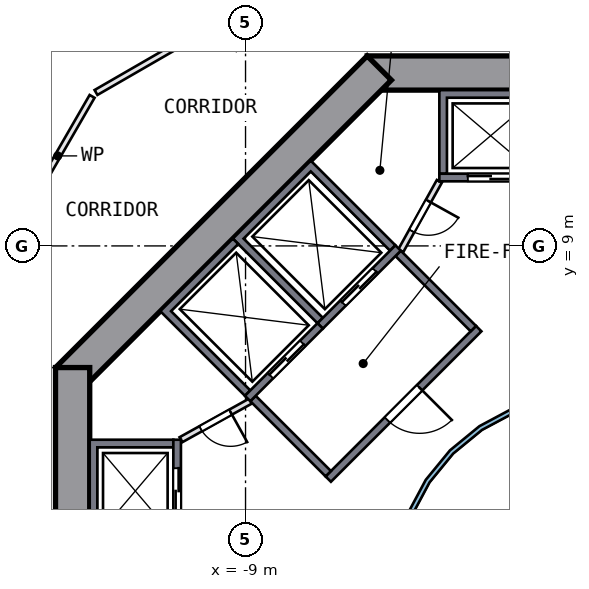
"""IFC4 building model, lengths in metres.
Left out: names, types, materials, properties, quantities, classifications, styles, units other than length and angle.
Written with IfcOpenShell. Run it as: python <this file> out.ifc"""

import sys

from ifc_helpers import new_model, si_unit, direction, frame, frame_2d, origin, place, context, subcontext, project, spatial, polyline, rectangle, outline, extrude, element, fill, save


model = new_model("IFC4")
c1 = context("Model", 3, precision=1e-05, world=origin(), true_north=direction((0.0, 1.0)))
c2 = subcontext(c1, "Body", "Model", "MODEL_VIEW")
j1 = project(units=[si_unit("LENGTHUNIT", "METRE"), si_unit("PLANEANGLEUNIT", "RADIAN")], contexts=[c1])
p1 = place(None, origin())
s1 = spatial("IfcSite", under=j1, at=p1, CompositionType="ELEMENT")
p2 = place(p1, origin())
s2 = spatial("IfcBuilding", under=s1, at=p2, CompositionType="ELEMENT")
p3 = place(p2, frame((0.0, 0.0, 19.0)))
s3 = spatial("IfcBuildingStorey", under=s2, at=p3, CompositionType="ELEMENT", Elevation=19.0)
p4 = place(p3, frame((5.799, 13.55, 0.0), z_axis=(0.0, 0.0, 1.0), x_axis=(-1.0, 0.0, 0.0)))
e1 = element("IfcWall", 1, at=p4, inside=s3, PredefinedType="SHEAR", context=c2, shape_type="SweptSolid", body=[
    extrude(rectangle(XDim=11.598, YDim=0.9, at=frame_2d((5.799, 0.0))), origin(), (0.0, 0.0, 1.0), 4.5),
])
p5 = place(p4, frame((4.899, 0.0, 0.0)))
e2 = element("IfcOpeningElement", 2, at=p5, cuts=e1, PredefinedType="OPENING", context=c2, shape_type="SweptSolid", body=[
    extrude(rectangle(XDim=1.8, YDim=2.1, at=frame_2d((0.9, 1.05))), frame((0.0, 0.46, 0.0), z_axis=(0.0, -1.0, 0.0), x_axis=(1.0, 0.0, 0.0)), (0.0, 0.0, 1.0), 0.92),
])
p6 = place(p3, frame((-5.481, 13.682, 0.0), z_axis=(0.0, 0.0, 1.0), x_axis=(-0.707106781, -0.707106781, 0.0)))
e3 = element("IfcWall", 3, at=p6, inside=s3, PredefinedType="SHEAR", context=c2, shape_type="SweptSolid", body=[
    extrude(rectangle(XDim=11.598, YDim=0.9, at=frame_2d((5.799, 0.0))), origin(), (0.0, 0.0, 1.0), 4.5),
])
p7 = place(p3, frame((-13.55, 5.799, 0.0), z_axis=(0.0, 0.0, 1.0), x_axis=(0.0, -1.0, 0.0)))
e4 = element("IfcWall", 4, at=p7, inside=s3, PredefinedType="SHEAR", context=c2, shape_type="SweptSolid", body=[
    extrude(rectangle(XDim=11.598, YDim=0.9, at=frame_2d((5.799, 0.0))), origin(), (0.0, 0.0, 1.0), 4.5),
])
p8 = place(p7, frame((4.899, 0.0, 0.0)))
e5 = element("IfcOpeningElement", 5, at=p8, cuts=e4, PredefinedType="OPENING", context=c2, shape_type="SweptSolid", body=[
    extrude(rectangle(XDim=1.8, YDim=2.1, at=frame_2d((0.9, 1.05))), frame((0.0, 0.46, 0.0), z_axis=(0.0, -1.0, 0.0), x_axis=(1.0, 0.0, 0.0)), (0.0, 0.0, 1.0), 0.92),
])
p9 = place(p3, origin())
e6 = element("IfcWall", 6, at=p9, inside=s3, PredefinedType="SOLIDWALL", context=c2, shape_type="SweptSolid", body=[
    extrude(outline(polyline([(-3.9, 10.9), (-3.9, 13.1), (-1.2, 13.1), (-1.2, 10.9), (-1.4, 10.9), (-1.4, 12.9), (-3.7, 12.9), (-3.7, 10.9), (-3.9, 10.9)])), origin(), (0.0, 0.0, 1.0), 4.05),
])
p10 = place(p3, frame((-1.2, 10.8, 0.0), z_axis=(0.0, 0.0, 1.0), x_axis=(-1.0, 0.0, 0.0)))
e7 = element("IfcWall", 7, at=p10, inside=s3, PredefinedType="SOLIDWALL", context=c2, shape_type="SweptSolid", body=[
    extrude(rectangle(XDim=2.7, YDim=0.2, at=frame_2d((1.35, 0.0))), origin(), (0.0, 0.0, 1.0), 4.05),
])
p11 = place(p10, frame((0.75, 0.0, 0.0)))
e8 = element("IfcOpeningElement", 8, at=p11, cuts=e7, PredefinedType="OPENING", context=c2, shape_type="SweptSolid", body=[
    extrude(rectangle(XDim=1.2, YDim=2.1, at=frame_2d((0.6, 1.05))), frame((0.0, 0.11, 0.0), z_axis=(0.0, -1.0, 0.0), x_axis=(1.0, 0.0, 0.0)), (0.0, 0.0, 1.0), 0.22),
])
p12 = place(p3, origin())
e9 = element("IfcWall", 9, at=p12, inside=s3, PredefinedType="SOLIDWALL", context=c2, shape_type="SweptSolid", body=[
    extrude(outline(polyline([(-13.1, 3.9), (-10.9, 3.9), (-10.9, 3.7), (-12.9, 3.7), (-12.9, 1.4), (-10.9, 1.4), (-10.9, 1.2), (-13.1, 1.2), (-13.1, 3.9)])), origin(), (0.0, 0.0, 1.0), 4.05),
])
p13 = place(p3, frame((-10.8, 1.2, 0.0), z_axis=(0.0, 0.0, 1.0), x_axis=(0.0, 1.0, 0.0)))
e10 = element("IfcWall", 10, at=p13, inside=s3, PredefinedType="SOLIDWALL", context=c2, shape_type="SweptSolid", body=[
    extrude(rectangle(XDim=2.7, YDim=0.2, at=frame_2d((1.35, 0.0))), origin(), (0.0, 0.0, 1.0), 4.05),
])
p14 = place(p13, frame((0.75, 0.0, 0.0)))
e11 = element("IfcOpeningElement", 11, at=p14, cuts=e10, PredefinedType="OPENING", context=c2, shape_type="SweptSolid", body=[
    extrude(rectangle(XDim=1.2, YDim=2.1, at=frame_2d((0.6, 1.05))), frame((0.0, 0.11, 0.0), z_axis=(0.0, -1.0, 0.0), x_axis=(1.0, 0.0, 0.0)), (0.0, 0.0, 1.0), 0.22),
])
p15 = place(p3, origin())
e12 = element("IfcWall", 12, at=p15, inside=s3, PredefinedType="SOLIDWALL", context=c2, shape_type="SweptSolid", body=[
    extrude(outline(polyline([(-9.334, 9.192), (-7.283, 11.243), (-5.056, 9.016), (-5.197, 8.874), (-7.283, 10.96), (-9.051, 9.192), (-6.965, 7.106), (-7.106, 6.965), (-9.334, 9.192)])), origin(), (0.0, 0.0, 1.0), 4.05),
])
p16 = place(p3, frame((-4.985, 8.945, 0.0), z_axis=(0.0, 0.0, 1.0), x_axis=(-0.707106781, -0.707106781, 0.0)))
e13 = element("IfcWall", 13, at=p16, inside=s3, PredefinedType="SOLIDWALL", context=c2, shape_type="SweptSolid", body=[
    extrude(rectangle(XDim=2.9, YDim=0.2, at=frame_2d((1.45, 0.0))), origin(), (0.0, 0.0, 1.0), 4.05),
])
p17 = place(p16, frame((0.85, 0.0, 0.0)))
e14 = element("IfcOpeningElement", 14, at=p17, cuts=e13, PredefinedType="OPENING", context=c2, shape_type="SweptSolid", body=[
    extrude(rectangle(XDim=1.2, YDim=2.1, at=frame_2d((0.6, 1.05))), frame((0.0, 0.11, 0.0), z_axis=(0.0, -1.0, 0.0), x_axis=(1.0, 0.0, 0.0)), (0.0, 0.0, 1.0), 0.22),
])
p18 = place(p3, origin())
e15 = element("IfcWall", 15, at=p18, inside=s3, PredefinedType="SOLIDWALL", context=c2, shape_type="SweptSolid", body=[
    extrude(outline(polyline([(-11.243, 7.283), (-9.334, 9.192), (-9.192, 9.051), (-10.96, 7.283), (-8.874, 5.197), (-9.016, 5.056), (-11.243, 7.283)])), origin(), (0.0, 0.0, 1.0), 4.05),
])
p19 = place(p3, frame((-7.036, 6.894, 0.0), z_axis=(0.0, 0.0, 1.0), x_axis=(-0.707106781, -0.707106781, 0.0)))
e16 = element("IfcWall", 16, at=p19, inside=s3, PredefinedType="SOLIDWALL", context=c2, shape_type="SweptSolid", body=[
    extrude(rectangle(XDim=2.7, YDim=0.2, at=frame_2d((1.35, 0.0))), origin(), (0.0, 0.0, 1.0), 4.05),
])
p20 = place(p19, frame((0.65, 0.0, 0.0)))
e17 = element("IfcOpeningElement", 17, at=p20, cuts=e16, PredefinedType="OPENING", context=c2, shape_type="SweptSolid", body=[
    extrude(rectangle(XDim=1.2, YDim=2.1, at=frame_2d((0.6, 1.05))), frame((0.0, 0.11, 0.0), z_axis=(0.0, -1.0, 0.0), x_axis=(1.0, 0.0, 0.0)), (0.0, 0.0, 1.0), 0.22),
])
p21 = place(p3, frame((-2.864, 6.823, 0.0), z_axis=(0.0, 0.0, 1.0), x_axis=(-0.707106781, -0.707106781, 0.0)))
e18 = element("IfcWall", 18, at=p21, inside=s3, PredefinedType="SOLIDWALL", context=c2, shape_type="SweptSolid", body=[
    extrude(rectangle(XDim=5.6, YDim=0.2, at=frame_2d((2.8, 0.0))), origin(), (0.0, 0.0, 1.0), 4.05),
])
p22 = place(p21, frame((2.2, 0.0, 0.0)))
e19 = element("IfcOpeningElement", 19, at=p22, cuts=e18, PredefinedType="OPENING", context=c2, shape_type="SweptSolid", body=[
    extrude(rectangle(XDim=1.2, YDim=2.1, at=frame_2d((0.6, 1.05))), frame((0.0, 0.11, 0.0), z_axis=(0.0, -1.0, 0.0), x_axis=(1.0, 0.0, 0.0)), (0.0, 0.0, 1.0), 0.22),
])
for number, where, z_axis, x_axis in (
    (20, (-3.005, 6.823, 0.0), (0.0, 0.0, 1.0), (-0.707, 0.707, 0.0)),
    (21, (-6.823, 3.005, 0.0), (0.0, 0.0, 1.0), (-0.707, 0.707, 0.0)),
):
    element("IfcWall", number, at=place(p3, frame(where, z_axis=z_axis, x_axis=x_axis)), inside=s3, PredefinedType="SOLIDWALL", context=c2, shape_type="SweptSolid", body=[
        extrude(rectangle(XDim=2.8, YDim=0.2, at=frame_2d((1.4, 0.0))), origin(), (0.0, 0.0, 1.0), 4.05),
    ])
p23 = place(p3, frame((-3.9, 10.7, 0.0), z_axis=(0.0, 0.0, 1.0), x_axis=(-0.485692555, -0.874129705, 0.0)))
e22 = element("IfcWall", 22, at=p23, inside=s3, PredefinedType="PARTITIONING", context=c2, shape_type="SweptSolid", body=[
    extrude(rectangle(XDim=2.089, YDim=0.15, at=frame_2d((1.044, 0.0))), origin(), (0.0, 0.0, 1.0), 4.05),
])
p24 = place(p23, frame((0.594, 0.0, 0.0)))
e23 = element("IfcOpeningElement", 23, at=p24, cuts=e22, PredefinedType="OPENING", context=c2, shape_type="SweptSolid", body=[
    extrude(rectangle(XDim=0.9, YDim=2.1, at=frame_2d((0.45, 1.05))), frame((0.0, 0.085, 0.0), z_axis=(0.0, -1.0, 0.0), x_axis=(1.0, 0.0, 0.0)), (0.0, 0.0, 1.0), 0.17),
])
p25 = place(p3, frame((-8.874, 4.914, 0.0), z_axis=(0.0, 0.0, 1.0), x_axis=(-0.874129705, -0.485692555, 0.0)))
e24 = element("IfcWall", 24, at=p25, inside=s3, PredefinedType="PARTITIONING", context=c2, shape_type="SweptSolid", body=[
    extrude(rectangle(XDim=2.089, YDim=0.15, at=frame_2d((1.044, 0.0))), origin(), (0.0, 0.0, 1.0), 4.05),
])
p26 = place(p25, frame((0.594, 0.0, 0.0)))
e25 = element("IfcOpeningElement", 25, at=p26, cuts=e24, PredefinedType="OPENING", context=c2, shape_type="SweptSolid", body=[
    extrude(rectangle(XDim=0.9, YDim=2.1, at=frame_2d((0.45, 1.05))), frame((0.0, 0.085, 0.0), z_axis=(0.0, -1.0, 0.0), x_axis=(1.0, 0.0, 0.0)), (0.0, 0.0, 1.0), 0.17),
])
p27 = place(p3, origin())
e26 = element("IfcWall", 26, at=p27, inside=s3, PredefinedType="SOLIDWALL", context=c2, shape_type="SweptSolid", body=[
    extrude(outline(polyline([(5.021, -0.999), (4.73, -1.959), (4.257, -2.844), (3.62, -3.62), (2.844, -4.257), (1.959, -4.73), (0.999, -5.021), (0.0, -5.12), (-0.999, -5.021), (-1.959, -4.73), (-2.844, -4.257), (-3.62, -3.62), (-4.257, -2.844), (-4.73, -1.959), (-5.021, -0.999), (-5.12, 0.0), (-5.021, 0.999), (-4.73, 1.959), (-4.257, 2.844), (-3.62, 3.62), (-2.844, 4.257), (-1.959, 4.73), (-0.999, 5.021), (0.0, 5.12), (0.999, 5.021), (1.959, 4.73), (2.844, 4.257), (3.62, 3.62), (4.257, 2.844), (4.73, 1.959), (5.021, 0.999), (5.12, 0.0), (5.021, -0.999)]), holes=[polyline([(4.904, 0.976), (4.619, 1.913), (4.157, 2.778), (3.535, 3.535), (2.778, 4.157), (1.913, 4.619), (0.976, 4.904), (0.0, 5.0), (-0.976, 4.904), (-1.913, 4.619), (-2.778, 4.157), (-3.535, 3.535), (-4.157, 2.778), (-4.619, 1.913), (-4.904, 0.976), (-5.0, 0.0), (-4.904, -0.976), (-4.619, -1.913), (-4.157, -2.778), (-3.535, -3.535), (-2.778, -4.157), (-1.913, -4.619), (-0.976, -4.904), (0.0, -5.0), (0.976, -4.904), (1.913, -4.619), (2.778, -4.157), (3.535, -3.535), (4.157, -2.778), (4.619, -1.913), (4.904, -0.976), (5.0, 0.0), (4.904, 0.976)])]), origin(), (0.0, 0.0, 1.0), 4.05),
])
p28 = place(p3, frame((-13.038, 12.935, 0.0), z_axis=(0.0, 0.0, 1.0), x_axis=(-0.499979668, -0.866037142, 0.0)))
e27 = element("IfcWall", 27, at=p28, inside=s3, PredefinedType="PARTITIONING", context=c2, shape_type="SweptSolid", body=[
    extrude(rectangle(XDim=9.367, YDim=0.15, at=frame_2d((4.683, 0.0))), origin(), (0.0, 0.0, 1.0), 4.05),
])
p29 = place(p28, frame((3.817, 0.0, 0.0)))
e28 = element("IfcOpeningElement", 28, at=p29, cuts=e27, PredefinedType="OPENING", context=c2, shape_type="SweptSolid", body=[
    extrude(rectangle(XDim=1.8, YDim=2.1, at=frame_2d((0.9, 1.05))), frame((0.0, 0.085, 0.0), z_axis=(0.0, -1.0, 0.0), x_axis=(1.0, 0.0, 0.0)), (0.0, 0.0, 1.0), 0.17),
])
p30 = place(p3, frame((-4.823, 17.721, 0.0), z_axis=(0.0, 0.0, 1.0), x_axis=(-0.866037142, -0.499979668, 0.0)))
e29 = element("IfcWall", 29, at=p30, inside=s3, PredefinedType="PARTITIONING", context=c2, shape_type="SweptSolid", body=[
    extrude(rectangle(XDim=9.367, YDim=0.15, at=frame_2d((4.683, 0.0))), origin(), (0.0, 0.0, 1.0), 4.05),
])
p31 = place(p30, frame((3.817, 0.0, 0.0)))
e30 = element("IfcOpeningElement", 30, at=p31, cuts=e29, PredefinedType="OPENING", context=c2, shape_type="SweptSolid", body=[
    extrude(rectangle(XDim=1.8, YDim=2.1, at=frame_2d((0.9, 1.05))), frame((0.0, 0.085, 0.0), z_axis=(0.0, -1.0, 0.0), x_axis=(1.0, 0.0, 0.0)), (0.0, 0.0, 1.0), 0.17),
])
p32 = place(p11, origin())
e31 = element("IfcDoor", 31, at=p32, inside=s3, OperationType="DOUBLE_DOOR_SLIDING", PredefinedType="DOOR", context=c2, shape_type="SweptSolid", body=[
    extrude(rectangle(XDim=1.2, YDim=2.1, at=frame_2d((0.6, 1.05))), frame((0.0, 0.025, 0.0), z_axis=(0.0, -1.0, 0.0), x_axis=(1.0, 0.0, 0.0)), (0.0, 0.0, 1.0), 0.05),
])
fill(e8, e31)
p33 = place(p14, origin())
e32 = element("IfcDoor", 32, at=p33, inside=s3, OperationType="DOUBLE_DOOR_SLIDING", PredefinedType="DOOR", context=c2, shape_type="SweptSolid", body=[
    extrude(rectangle(XDim=1.2, YDim=2.1, at=frame_2d((0.6, 1.05))), frame((0.0, 0.025, 0.0), z_axis=(0.0, -1.0, 0.0), x_axis=(1.0, 0.0, 0.0)), (0.0, 0.0, 1.0), 0.05),
])
fill(e11, e32)
p34 = place(p17, origin())
e33 = element("IfcDoor", 33, at=p34, inside=s3, OperationType="DOUBLE_DOOR_SLIDING", PredefinedType="DOOR", context=c2, shape_type="SweptSolid", body=[
    extrude(rectangle(XDim=1.2, YDim=2.1, at=frame_2d((0.6, 1.05))), frame((0.0, 0.025, 0.0), z_axis=(0.0, -1.0, 0.0), x_axis=(1.0, 0.0, 0.0)), (0.0, 0.0, 1.0), 0.05),
])
fill(e14, e33)
p35 = place(p20, origin())
e34 = element("IfcDoor", 34, at=p35, inside=s3, OperationType="DOUBLE_DOOR_SLIDING", PredefinedType="DOOR", context=c2, shape_type="SweptSolid", body=[
    extrude(rectangle(XDim=1.2, YDim=2.1, at=frame_2d((0.6, 1.05))), frame((0.0, 0.025, 0.0), z_axis=(0.0, -1.0, 0.0), x_axis=(1.0, 0.0, 0.0)), (0.0, 0.0, 1.0), 0.05),
])
fill(e17, e34)
p36 = place(p22, origin())
e35 = element("IfcDoor", 35, at=p36, inside=s3, OperationType="SINGLE_SWING_LEFT", PredefinedType="DOOR", context=c2, shape_type="SweptSolid", body=[
    extrude(rectangle(XDim=1.2, YDim=2.1, at=frame_2d((0.6, 1.05))), frame((0.0, 0.025, 0.0), z_axis=(0.0, -1.0, 0.0), x_axis=(1.0, 0.0, 0.0)), (0.0, 0.0, 1.0), 0.05),
])
fill(e19, e35)
p37 = place(p24, origin())
e36 = element("IfcDoor", 36, at=p37, inside=s3, OperationType="SINGLE_SWING_LEFT", PredefinedType="DOOR", context=c2, shape_type="SweptSolid", body=[
    extrude(rectangle(XDim=0.9, YDim=2.1, at=frame_2d((0.45, 1.05))), frame((0.0, 0.025, 0.0), z_axis=(0.0, -1.0, 0.0), x_axis=(1.0, 0.0, 0.0)), (0.0, 0.0, 1.0), 0.05),
])
fill(e23, e36)
p38 = place(p26, origin())
e37 = element("IfcDoor", 37, at=p38, inside=s3, OperationType="SINGLE_SWING_LEFT", PredefinedType="DOOR", context=c2, shape_type="SweptSolid", body=[
    extrude(rectangle(XDim=0.9, YDim=2.1, at=frame_2d((0.45, 1.05))), frame((0.0, 0.025, 0.0), z_axis=(0.0, -1.0, 0.0), x_axis=(1.0, 0.0, 0.0)), (0.0, 0.0, 1.0), 0.05),
])
fill(e25, e37)
save(model, sys.argv[1])
